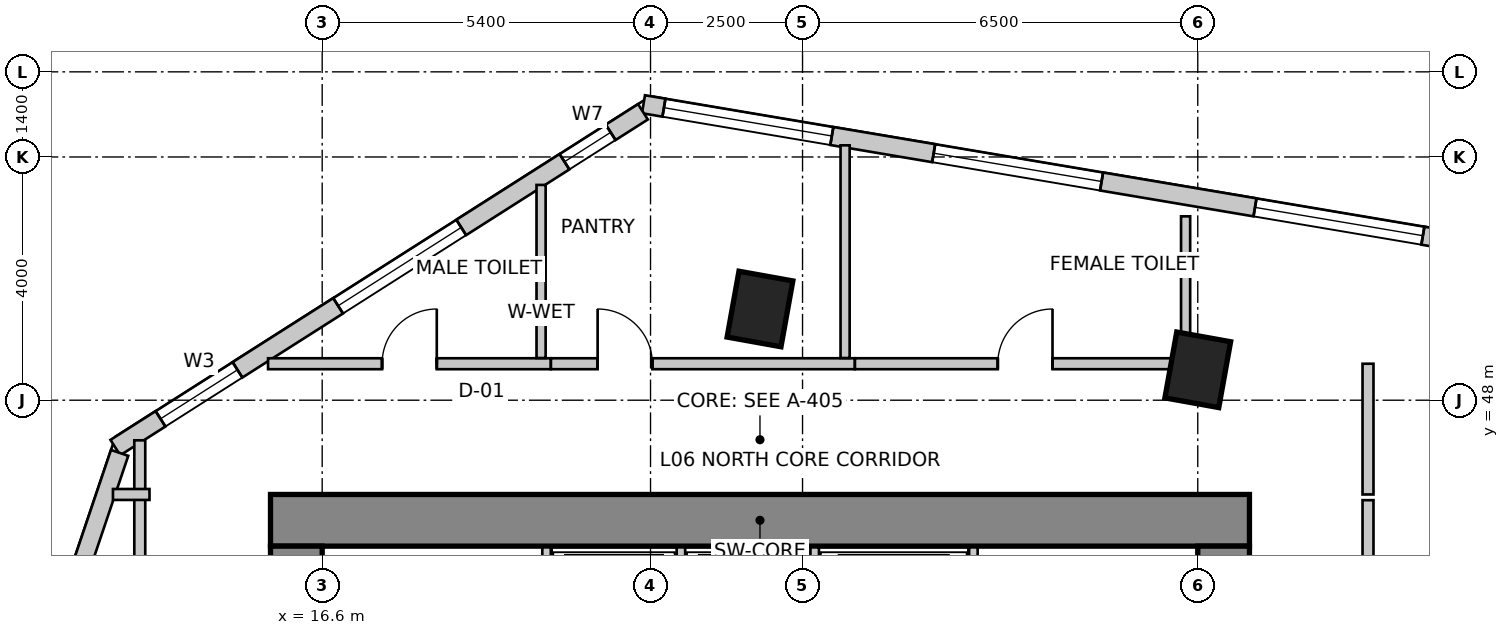
"""IFC4 building model, lengths in metres.
Left out: names, types, materials, properties, quantities, classifications, styles, units other than length and angle.
Written with IfcOpenShell. Run it as: python <this file> out.ifc"""

import sys

from ifc_helpers import new_model, si_unit, direction, frame, frame_2d, origin, origin_2d, place, context, subcontext, project, spatial, rectangle, extrude, source, transform, mapped, element, fill, save


model = new_model("IFC4")
c1 = context("Model", 3, precision=1e-05, world=origin(), true_north=direction((0.0, 1.0)))
c2 = subcontext(c1, "Body", "Model", "MODEL_VIEW")
j1 = project(units=[si_unit("LENGTHUNIT", "METRE"), si_unit("PLANEANGLEUNIT", "RADIAN")], contexts=[c1])
p1 = place(None, origin())
s1 = spatial("IfcSite", under=j1, at=p1, CompositionType="ELEMENT")
p2 = place(p1, origin())
s2 = spatial("IfcBuilding", under=s1, at=p2, CompositionType="ELEMENT")
p3 = place(p2, frame((0.0, 0.0, 27.0)))
s3 = spatial("IfcBuildingStorey", under=s2, at=p3, CompositionType="ELEMENT", Elevation=27.0)
p4 = place(p3, frame((15.75, 46.025, 0.0), z_axis=(0.0, 0.0, 1.0), x_axis=(1.0, 0.0, 0.0)))
e1 = element("IfcWall", 1, at=p4, inside=s3, PredefinedType="SHEAR", context=c2, shape_type="SweptSolid", body=[
    extrude(rectangle(XDim=16.1, YDim=0.85, at=frame_2d((8.05, 0.0))), origin(), (0.0, 0.0, 1.0), 4.0),
])
p5 = place(p3, frame((16.175, 34.2, 0.0), z_axis=(0.0, 0.0, 1.0), x_axis=(0.0, 1.0, 0.0)))
e2 = element("IfcWall", 2, at=p5, inside=s3, PredefinedType="SHEAR", context=c2, shape_type="SweptSolid", body=[
    extrude(rectangle(XDim=11.4, YDim=0.85, at=frame_2d((5.7, 0.0))), origin(), (0.0, 0.0, 1.0), 4.0),
])
m1 = source(origin(), c2, "Body", "SweptSolid", [
    extrude(rectangle(XDim=1.1, YDim=2.15, at=frame_2d((0.55, 1.075))), frame((0.0, 0.435, 0.0), z_axis=(0.0, -1.0, 0.0), x_axis=(1.0, 0.0, 0.0)), (0.0, 0.0, 1.0), 0.87),
])
p6 = place(p5, frame((7.15, 0.0, 0.0)))
e3 = element("IfcOpeningElement", 3, at=p6, cuts=e2, PredefinedType="OPENING", context=c2, shape_type="MappedRepresentation", body=[
    mapped(m1, transform((0.0, 0.0, 0.0), scale=1.0)),
])
p7 = place(p3, frame((31.425, 34.2, 0.0), z_axis=(0.0, 0.0, 1.0), x_axis=(0.0, 1.0, 0.0)))
e4 = element("IfcWall", 4, at=p7, inside=s3, PredefinedType="SHEAR", context=c2, shape_type="SweptSolid", body=[
    extrude(rectangle(XDim=11.4, YDim=0.85, at=frame_2d((5.7, 0.0))), origin(), (0.0, 0.0, 1.0), 4.0),
])
p8 = place(p7, frame((7.35, 0.0, 0.0)))
e5 = element("IfcOpeningElement", 5, at=p8, cuts=e4, PredefinedType="OPENING", context=c2, shape_type="MappedRepresentation", body=[
    mapped(m1, transform((0.0, 0.0, 0.0), scale=1.0)),
])
m2 = source(origin(), c2, "Body", "SweptSolid", [
    extrude(rectangle(XDim=0.9, YDim=1.1, at=origin_2d()), origin(), (0.0, 0.0, 1.0), 4.0),
])
for number, where, z_axis, x_axis in (
    (6, (23.8, 49.5, 0.0), (0.0, 0.0, 1.0), (0.984, -0.177, 0.0)),
    (7, (31.0, 48.5, 0.0), (0.0, 0.0, 1.0), (0.984, -0.177, 0.0)),
):
    element("IfcColumn", number, at=place(p3, frame(where, z_axis=z_axis, x_axis=x_axis)), inside=s3, PredefinedType="COLUMN", context=c2, shape_type="MappedRepresentation", body=[
        mapped(m2, transform((0.0, 0.0, 0.0), scale=1.0)),
    ])
p9 = place(p3, frame((58.761, 46.648, 0.0), z_axis=(0.0, 0.0, 1.0), x_axis=(-0.98607502735, 0.166301053624, 0.0)))
e8 = element("IfcWall", 8, at=p9, inside=s3, PredefinedType="SOLIDWALL", context=c2, shape_type="SweptSolid", body=[
    extrude(rectangle(XDim=37.397, YDim=0.3, at=frame_2d((18.699, 0.0))), origin(), (0.0, 0.0, 1.0), 3.75),
])
m3 = source(origin(), c2, "Body", "SweptSolid", [
    extrude(rectangle(XDim=2.4, YDim=2.2, at=frame_2d((1.2, 1.1))), frame((0.0, 0.16, 0.0), z_axis=(0.0, -1.0, 0.0), x_axis=(1.0, 0.0, 0.0)), (0.0, 0.0, 1.0), 0.32),
])
p10 = place(p9, frame((0.375, 0.0, 0.85)))
e9 = element("IfcOpeningElement", 9, at=p10, cuts=e8, PredefinedType="OPENING", context=c2, shape_type="MappedRepresentation", body=[
    mapped(m3, transform((0.0, 0.0, 0.0), scale=1.0)),
])
m4 = source(origin(), c2, "Body", "SweptSolid", [
    extrude(rectangle(XDim=2.8, YDim=2.4, at=frame_2d((1.4, 1.2))), frame((0.0, 0.16, 0.0), z_axis=(0.0, -1.0, 0.0), x_axis=(1.0, 0.0, 0.0)), (0.0, 0.0, 1.0), 0.32),
])
p11 = place(p9, frame((4.54, 0.0, 0.85)))
e10 = element("IfcOpeningElement", 10, at=p11, cuts=e8, PredefinedType="OPENING", context=c2, shape_type="MappedRepresentation", body=[
    mapped(m4, transform((0.0, 0.0, 0.0), scale=1.0)),
])
p12 = place(p9, frame((10.081, 0.0, 0.85)))
e11 = element("IfcOpeningElement", 11, at=p12, cuts=e8, PredefinedType="OPENING", context=c2, shape_type="MappedRepresentation", body=[
    mapped(m3, transform((0.0, 0.0, 0.0), scale=1.0)),
])
p13 = place(p9, frame((15.273, 0.0, 0.85)))
e12 = element("IfcOpeningElement", 12, at=p13, cuts=e8, PredefinedType="OPENING", context=c2, shape_type="MappedRepresentation", body=[
    mapped(m4, transform((0.0, 0.0, 0.0), scale=1.0)),
])
p14 = place(p9, frame((20.036, 0.0, 0.85)))
e13 = element("IfcOpeningElement", 13, at=p14, cuts=e8, PredefinedType="OPENING", context=c2, shape_type="MappedRepresentation", body=[
    mapped(m3, transform((0.0, 0.0, 0.0), scale=1.0)),
])
p15 = place(p9, frame((24.398, 0.0, 0.85)))
e14 = element("IfcOpeningElement", 14, at=p15, cuts=e8, PredefinedType="OPENING", context=c2, shape_type="MappedRepresentation", body=[
    mapped(m4, transform((0.0, 0.0, 0.0), scale=1.0)),
])
p16 = place(p9, frame((29.757, 0.0, 0.85)))
e15 = element("IfcOpeningElement", 15, at=p16, cuts=e8, PredefinedType="OPENING", context=c2, shape_type="MappedRepresentation", body=[
    mapped(m4, transform((0.0, 0.0, 0.0), scale=1.0)),
])
p17 = place(p9, frame((34.256, 0.0, 0.85)))
e16 = element("IfcOpeningElement", 16, at=p17, cuts=e8, PredefinedType="OPENING", context=c2, shape_type="MappedRepresentation", body=[
    mapped(m4, transform((0.0, 0.0, 0.0), scale=1.0)),
])
p18 = place(p3, frame((21.875, 52.743, 0.0), z_axis=(0.0, 0.0, 1.0), x_axis=(-0.843647802826, -0.536896996441, 0.0)))
e17 = element("IfcWall", 17, at=p18, inside=s3, PredefinedType="SOLIDWALL", context=c2, shape_type="SweptSolid", body=[
    extrude(rectangle(XDim=10.284, YDim=0.3, at=frame_2d((5.142, 0.0))), origin(), (0.0, 0.0, 1.0), 3.75),
])
m5 = source(origin(), c2, "Body", "SweptSolid", [
    extrude(rectangle(XDim=0.9, YDim=1.6, at=frame_2d((0.45, 0.8))), frame((0.0, 0.16, 0.0), z_axis=(0.0, -1.0, 0.0), x_axis=(1.0, 0.0, 0.0)), (0.0, 0.0, 1.0), 0.32),
])
p19 = place(p18, frame((0.629, 0.0, 0.85)))
e18 = element("IfcOpeningElement", 18, at=p19, cuts=e17, PredefinedType="OPENING", context=c2, shape_type="MappedRepresentation", body=[
    mapped(m5, transform((0.0, 0.0, 0.0), scale=1.0)),
])
p20 = place(p18, frame((3.542, 0.0, 0.85)))
e19 = element("IfcOpeningElement", 19, at=p20, cuts=e17, PredefinedType="OPENING", context=c2, shape_type="MappedRepresentation", body=[
    mapped(m3, transform((0.0, 0.0, 0.0), scale=1.0)),
])
m6 = source(origin(), c2, "Body", "SweptSolid", [
    extrude(rectangle(XDim=1.5, YDim=1.8, at=frame_2d((0.75, 0.9))), frame((0.0, 0.16, 0.0), z_axis=(0.0, -1.0, 0.0), x_axis=(1.0, 0.0, 0.0)), (0.0, 0.0, 1.0), 0.32),
])
p21 = place(p18, frame((7.904, 0.0, 0.85)))
e20 = element("IfcOpeningElement", 20, at=p21, cuts=e17, PredefinedType="OPENING", context=c2, shape_type="MappedRepresentation", body=[
    mapped(m6, transform((0.0, 0.0, 0.0), scale=1.0)),
])
p22 = place(p3, frame((13.269, 47.134, 0.0), z_axis=(0.0, 0.0, 1.0), x_axis=(-0.319920423265, -0.947444416722, 0.0)))
e21 = element("IfcWall", 21, at=p22, inside=s3, PredefinedType="SOLIDWALL", context=c2, shape_type="SweptSolid", body=[
    extrude(rectangle(XDim=16.135, YDim=0.3, at=frame_2d((8.067, 0.0))), origin(), (0.0, 0.0, 1.0), 3.75),
])
p23 = place(p22, frame((1.988, 0.0, 0.85)))
e22 = element("IfcOpeningElement", 22, at=p23, cuts=e21, PredefinedType="OPENING", context=c2, shape_type="MappedRepresentation", body=[
    mapped(m4, transform((0.0, 0.0, 0.0), scale=1.0)),
])
p24 = place(p22, frame((7.159, 0.0, 0.85)))
e23 = element("IfcOpeningElement", 23, at=p24, cuts=e21, PredefinedType="OPENING", context=c2, shape_type="MappedRepresentation", body=[
    mapped(m3, transform((0.0, 0.0, 0.0), scale=1.0)),
])
p25 = place(p22, frame((11.93, 0.0, 0.85)))
e24 = element("IfcOpeningElement", 24, at=p25, cuts=e21, PredefinedType="OPENING", context=c2, shape_type="MappedRepresentation", body=[
    mapped(m4, transform((0.0, 0.0, 0.0), scale=1.0)),
])
for number, where, z_axis, x_axis in (
    (25, (20.29, 43.28, 0.0), (0.0, 0.0, 1.0), (0.0, 1.0, 0.0)),
    (26, (27.31, 43.28, 0.0), (0.0, 0.0, 1.0), (0.0, 1.0, 0.0)),
):
    element("IfcWall", number, at=place(p3, frame(where, z_axis=z_axis, x_axis=x_axis)), inside=s3, PredefinedType="SOLIDWALL", context=c2, shape_type="SweptSolid", body=[
        extrude(rectangle(XDim=2.3, YDim=0.14, at=frame_2d((1.15, 0.0))), origin(), (0.0, 0.0, 1.0), 3.75),
    ])
for number, where, z_axis, x_axis in (
    (27, (22.5, 43.02, 0.0), (0.0, 0.0, 1.0), (0.0, 1.0, 0.0)),
    (28, (24.7, 43.02, 0.0), (0.0, 0.0, 1.0), (0.0, 1.0, 0.0)),
):
    element("IfcWall", number, at=place(p3, frame(where, z_axis=z_axis, x_axis=x_axis)), inside=s3, PredefinedType="SOLIDWALL", context=c2, shape_type="SweptSolid", body=[
        extrude(rectangle(XDim=2.56, YDim=0.14, at=frame_2d((1.28, 0.0))), origin(), (0.0, 0.0, 1.0), 3.75),
    ])
p26 = place(p3, frame((13.6, 33.444, 0.0), z_axis=(0.0, 0.0, 1.0), x_axis=(0.0, 1.0, 0.0)))
e29 = element("IfcWall", 29, at=p26, inside=s3, PredefinedType="PARTITIONING", context=c2, shape_type="SweptSolid", body=[
    extrude(rectangle(XDim=13.896, YDim=0.18, at=frame_2d((6.948, 0.0))), origin(), (0.0, 0.0, 1.0), 2.892),
])
m7 = source(origin(), c2, "Body", "SweptSolid", [
    extrude(rectangle(XDim=0.9, YDim=2.15, at=frame_2d((0.45, 1.075))), frame((0.0, 0.1, 0.0), z_axis=(0.0, -1.0, 0.0), x_axis=(1.0, 0.0, 0.0)), (0.0, 0.0, 1.0), 0.2),
])
p27 = place(p26, frame((4.144, 0.0, 0.0)))
e30 = element("IfcOpeningElement", 30, at=p27, cuts=e29, PredefinedType="OPENING", context=c2, shape_type="MappedRepresentation", body=[
    mapped(m7, transform((0.0, 0.0, 0.0), scale=1.0)),
])
p28 = place(p3, frame((13.76, 46.45, 0.0), z_axis=(0.0, 0.0, 1.0), x_axis=(-1.0, 0.0, 0.0)))
e31 = element("IfcWall", 31, at=p28, inside=s3, PredefinedType="PARTITIONING", context=c2, shape_type="SweptSolid", body=[
    extrude(rectangle(XDim=0.601, YDim=0.18, at=frame_2d((0.301, 0.0))), origin(), (0.0, 0.0, 1.0), 3.75),
])
p29 = place(p3, frame((15.71, 48.6, 0.0), z_axis=(0.0, 0.0, 1.0), x_axis=(1.0, 0.0, 0.0)))
e32 = element("IfcWall", 32, at=p29, inside=s3, PredefinedType="PARTITIONING", context=c2, shape_type="SweptSolid", body=[
    extrude(rectangle(XDim=4.65, YDim=0.18, at=frame_2d((2.325, 0.0))), origin(), (0.0, 0.0, 1.0), 3.75),
])
p30 = place(p29, frame((1.875, 0.0, 0.0)))
e33 = element("IfcOpeningElement", 33, at=p30, cuts=e32, PredefinedType="OPENING", context=c2, shape_type="MappedRepresentation", body=[
    mapped(m7, transform((0.0, 0.0, 0.0), scale=1.0)),
])
p31 = place(p3, frame((20.362, 48.6, 0.0), z_axis=(0.0, 0.0, 1.0), x_axis=(1.0, 0.0, 0.0)))
e34 = element("IfcWall", 34, at=p31, inside=s3, PredefinedType="PARTITIONING", context=c2, shape_type="SweptSolid", body=[
    extrude(rectangle(XDim=4.998, YDim=0.18, at=frame_2d((2.499, 0.0))), origin(), (0.0, 0.0, 1.0), 3.335),
])
p32 = place(p31, frame((0.768, 0.0, 0.0)))
e35 = element("IfcOpeningElement", 35, at=p32, cuts=e34, PredefinedType="OPENING", context=c2, shape_type="MappedRepresentation", body=[
    mapped(m7, transform((0.0, 0.0, 0.0), scale=1.0)),
])
p33 = place(p3, frame((25.362, 48.6, 0.0), z_axis=(0.0, 0.0, 1.0), x_axis=(1.0, 0.0, 0.0)))
e36 = element("IfcWall", 36, at=p33, inside=s3, PredefinedType="PARTITIONING", context=c2, shape_type="SweptSolid", body=[
    extrude(rectangle(XDim=5.598, YDim=0.18, at=frame_2d((2.799, 0.0))), origin(), (0.0, 0.0, 1.0), 2.892),
])
p34 = place(p33, frame((2.349, 0.0, 0.0)))
e37 = element("IfcOpeningElement", 37, at=p34, cuts=e36, PredefinedType="OPENING", context=c2, shape_type="MappedRepresentation", body=[
    mapped(m7, transform((0.0, 0.0, 0.0), scale=1.0)),
])
p35 = place(p3, frame((33.8, 48.6, 0.0), z_axis=(0.0, 0.0, 1.0), x_axis=(0.0, -1.0, 0.0)))
e38 = element("IfcWall", 38, at=p35, inside=s3, PredefinedType="PARTITIONING", context=c2, shape_type="SweptSolid", body=[
    extrude(rectangle(XDim=2.15, YDim=0.18, at=frame_2d((1.075, 0.0))), origin(), (0.0, 0.0, 1.0), 2.892),
])
p36 = place(p3, frame((33.8, 46.356, 0.0), z_axis=(0.0, 0.0, 1.0), x_axis=(0.0, -1.0, 0.0)))
e39 = element("IfcWall", 39, at=p36, inside=s3, PredefinedType="PARTITIONING", context=c2, shape_type="SweptSolid", body=[
    extrude(rectangle(XDim=8.516, YDim=0.18, at=frame_2d((4.258, 0.0))), origin(), (0.0, 0.0, 1.0), 3.188),
])
p37 = place(p3, frame((20.2, 51.54, 0.0), z_axis=(0.0, 0.0, 1.0), x_axis=(0.0, -1.0, 0.0)))
e40 = element("IfcWall", 40, at=p37, inside=s3, PredefinedType="PARTITIONING", context=c2, shape_type="SweptSolid", body=[
    extrude(rectangle(XDim=2.846, YDim=0.15, at=frame_2d((1.423, 0.0))), origin(), (0.0, 0.0, 1.0), 3.75),
])
p38 = place(p3, frame((25.2, 52.192, 0.0), z_axis=(0.0, 0.0, 1.0), x_axis=(0.0, -1.0, 0.0)))
e41 = element("IfcWall", 41, at=p38, inside=s3, PredefinedType="PARTITIONING", context=c2, shape_type="SweptSolid", body=[
    extrude(rectangle(XDim=3.498, YDim=0.15, at=frame_2d((1.749, 0.0))), origin(), (0.0, 0.0, 1.0), 2.892),
])
p39 = place(p3, frame((30.8, 51.024, 0.0), z_axis=(0.0, 0.0, 1.0), x_axis=(0.0, -1.0, 0.0)))
e42 = element("IfcWall", 42, at=p39, inside=s3, PredefinedType="PARTITIONING", context=c2, shape_type="SweptSolid", body=[
    extrude(rectangle(XDim=2.204, YDim=0.15, at=frame_2d((1.102, 0.0))), origin(), (0.0, 0.0, 1.0), 3.75),
])
m8 = source(origin(), c2, "Body", "SweptSolid", [
    extrude(rectangle(XDim=2.8, YDim=2.4, at=frame_2d((1.4, 1.2))), frame((0.0, -0.015, 0.0), z_axis=(0.0, -1.0, 0.0), x_axis=(1.0, 0.0, 0.0)), (0.0, 0.0, 1.0), 0.06),
])
p40 = place(p15, origin())
e43 = element("IfcWindow", 43, at=p40, inside=s3, PartitioningType="SINGLE_PANEL", PredefinedType="WINDOW", context=c2, shape_type="MappedRepresentation", body=[
    mapped(m8, transform((0.0, 0.0, 0.0), scale=1.0)),
])
fill(e14, e43)
p41 = place(p16, origin())
e44 = element("IfcWindow", 44, at=p41, inside=s3, PartitioningType="SINGLE_PANEL", PredefinedType="WINDOW", context=c2, shape_type="MappedRepresentation", body=[
    mapped(m8, transform((0.0, 0.0, 0.0), scale=1.0)),
])
fill(e15, e44)
p42 = place(p17, origin())
e45 = element("IfcWindow", 45, at=p42, inside=s3, PartitioningType="SINGLE_PANEL", PredefinedType="WINDOW", context=c2, shape_type="MappedRepresentation", body=[
    mapped(m8, transform((0.0, 0.0, 0.0), scale=1.0)),
])
fill(e16, e45)
m9 = source(origin(), c2, "Body", "SweptSolid", [
    extrude(rectangle(XDim=0.9, YDim=1.6, at=frame_2d((0.45, 0.8))), frame((0.0, -0.015, 0.0), z_axis=(0.0, -1.0, 0.0), x_axis=(1.0, 0.0, 0.0)), (0.0, 0.0, 1.0), 0.06),
])
p43 = place(p19, origin())
e46 = element("IfcWindow", 46, at=p43, inside=s3, PartitioningType="SINGLE_PANEL", PredefinedType="WINDOW", context=c2, shape_type="MappedRepresentation", body=[
    mapped(m9, transform((0.0, 0.0, 0.0), scale=1.0)),
])
fill(e18, e46)
m10 = source(origin(), c2, "Body", "SweptSolid", [
    extrude(rectangle(XDim=2.4, YDim=2.2, at=frame_2d((1.2, 1.1))), frame((0.0, -0.015, 0.0), z_axis=(0.0, -1.0, 0.0), x_axis=(1.0, 0.0, 0.0)), (0.0, 0.0, 1.0), 0.06),
])
p44 = place(p20, origin())
e47 = element("IfcWindow", 47, at=p44, inside=s3, PartitioningType="SINGLE_PANEL", PredefinedType="WINDOW", context=c2, shape_type="MappedRepresentation", body=[
    mapped(m10, transform((0.0, 0.0, 0.0), scale=1.0)),
])
fill(e19, e47)
m11 = source(origin(), c2, "Body", "SweptSolid", [
    extrude(rectangle(XDim=1.5, YDim=1.8, at=frame_2d((0.75, 0.9))), frame((0.0, -0.015, 0.0), z_axis=(0.0, -1.0, 0.0), x_axis=(1.0, 0.0, 0.0)), (0.0, 0.0, 1.0), 0.06),
])
p45 = place(p21, origin())
e48 = element("IfcWindow", 48, at=p45, inside=s3, PartitioningType="SINGLE_PANEL", PredefinedType="WINDOW", context=c2, shape_type="MappedRepresentation", body=[
    mapped(m11, transform((0.0, 0.0, 0.0), scale=1.0)),
])
fill(e20, e48)
m12 = source(origin(), c2, "Body", "SweptSolid", [
    extrude(rectangle(XDim=0.9, YDim=2.15, at=frame_2d((0.45, 1.075))), frame((0.0, 0.025, 0.0), z_axis=(0.0, -1.0, 0.0), x_axis=(1.0, 0.0, 0.0)), (0.0, 0.0, 1.0), 0.05),
])
p46 = place(p30, origin())
e49 = element("IfcDoor", 49, at=p46, inside=s3, OperationType="SINGLE_SWING_RIGHT", PredefinedType="DOOR", context=c2, shape_type="MappedRepresentation", body=[
    mapped(m12, transform((0.0, 0.0, 0.0), scale=1.0)),
])
fill(e33, e49)
p47 = place(p32, origin())
e50 = element("IfcDoor", 50, at=p47, inside=s3, OperationType="SINGLE_SWING_LEFT", PredefinedType="DOOR", context=c2, shape_type="MappedRepresentation", body=[
    mapped(m12, transform((0.0, 0.0, 0.0), scale=1.0)),
])
fill(e35, e50)
p48 = place(p34, origin())
e51 = element("IfcDoor", 51, at=p48, inside=s3, OperationType="SINGLE_SWING_RIGHT", PredefinedType="DOOR", context=c2, shape_type="MappedRepresentation", body=[
    mapped(m12, transform((0.0, 0.0, 0.0), scale=1.0)),
])
fill(e37, e51)
save(model, sys.argv[1])
